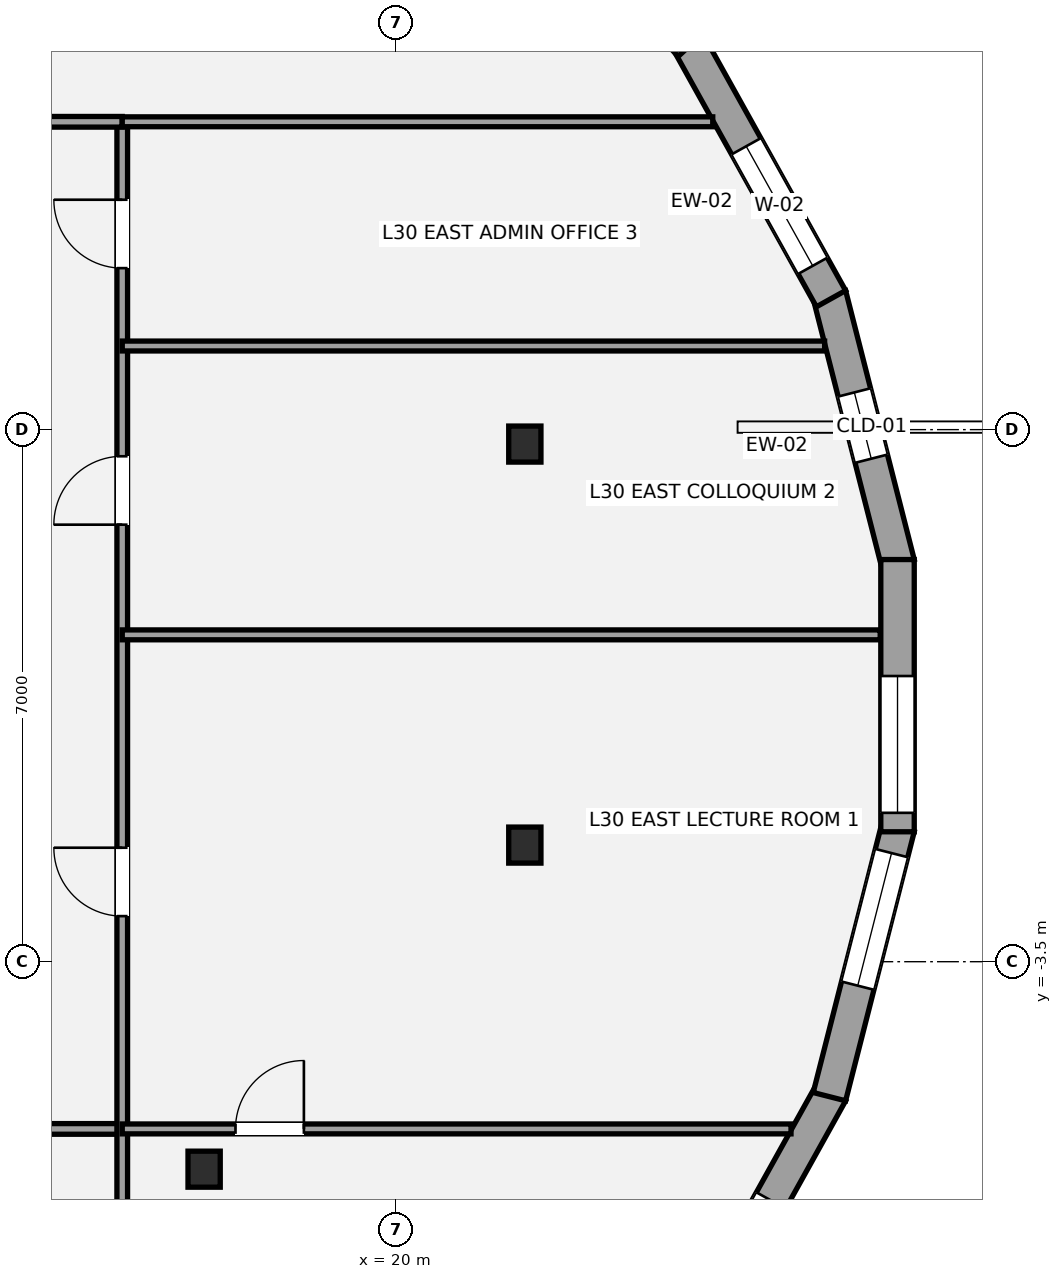
"""IFC4 building model, lengths in metres.
Left out: names, types, materials, properties, quantities, classifications, styles, units other than length and angle.
Written with IfcOpenShell. Run it as: python <this file> out.ifc"""

import sys

from ifc_helpers import new_model, si_unit, direction, frame, frame_2d, origin, origin_2d, place, context, subcontext, project, spatial, rectangle, i_section, extrude, element, fill, save


model = new_model("IFC4")
c1 = context("Model", 3, precision=1e-05, world=origin(), true_north=direction((0.0, 1.0)))
c2 = subcontext(c1, "Body", "Model", "MODEL_VIEW")
j1 = project(units=[si_unit("LENGTHUNIT", "METRE"), si_unit("PLANEANGLEUNIT", "RADIAN")], contexts=[c1])
p1 = place(None, origin())
s1 = spatial("IfcSite", under=j1, at=p1, CompositionType="ELEMENT")
p2 = place(p1, origin())
s2 = spatial("IfcBuilding", under=s1, at=p2, CompositionType="ELEMENT")
p3 = place(p2, frame((0.0, 0.0, 114.1)))
s3 = spatial("IfcBuildingStorey", under=s2, at=p3, CompositionType="ELEMENT", Elevation=114.1)
for number, where, z_axis, x_axis in (
    (1, (21.697, 3.31, 0.0), (0.0, 0.0, 1.0), (1.0, 0.0, 0.0)),
    (2, (17.477, -6.229, 0.0), (0.0, 0.0, 1.0), (1.0, 0.0, 0.0)),
    (3, (21.697, -1.966, 0.0), (0.0, 0.0, 1.0), (1.0, 0.0, 0.0)),
):
    element("IfcColumn", number, at=place(p3, frame(where, z_axis=z_axis, x_axis=x_axis)), inside=s3, PredefinedType="COLUMN", context=c2, shape_type="SweptSolid", body=[
        extrude(i_section(OverallWidth=0.424, OverallDepth=0.474, WebThickness=0.048, FlangeThickness=0.077, at=origin_2d()), origin(), (0.0, 0.0, 1.0), 3.5),
    ])
p4 = place(p3, frame((25.704, 5.276, 0.0), z_axis=(0.0, 0.0, 1.0), x_axis=(0.247172296022, -0.968971545547, 0.0)))
e4 = element("IfcWall", 4, at=p4, inside=s3, PredefinedType="STANDARD", context=c2, shape_type="SweptSolid", body=[
    extrude(rectangle(XDim=3.653, YDim=0.44, at=frame_2d((1.826, 0.0))), origin(), (0.0, 0.0, 1.0), 2.528),
])
p5 = place(p4, frame((1.327, 0.0, 0.58)))
e5 = element("IfcOpeningElement", 5, at=p5, cuts=e4, PredefinedType="OPENING", context=c2, shape_type="SweptSolid", body=[
    extrude(rectangle(XDim=0.9, YDim=1.35, at=frame_2d((0.45, 0.675))), frame((0.0, 0.23, 0.0), z_axis=(0.0, -1.0, 0.0), x_axis=(1.0, 0.0, 0.0)), (0.0, 0.0, 1.0), 0.46),
])
p6 = place(p3, frame((23.844, 8.603, 0.0), z_axis=(0.0, 0.0, 1.0), x_axis=(0.486285838125, -0.873799796086, 0.0)))
e6 = element("IfcWall", 6, at=p6, inside=s3, PredefinedType="STANDARD", context=c2, shape_type="SweptSolid", body=[
    extrude(rectangle(XDim=3.868, YDim=0.44, at=frame_2d((1.934, 0.0))), origin(), (0.0, 0.0, 1.0), 2.528),
])
p7 = place(p6, frame((1.574, 0.0, 0.65)))
e7 = element("IfcOpeningElement", 7, at=p7, cuts=e6, PredefinedType="OPENING", context=c2, shape_type="SweptSolid", body=[
    extrude(rectangle(XDim=1.8, YDim=1.7, at=frame_2d((0.9, 0.85))), frame((0.0, 0.23, 0.0), z_axis=(0.0, -1.0, 0.0), x_axis=(1.0, 0.0, 0.0)), (0.0, 0.0, 1.0), 0.46),
])
p8 = place(p3, frame((21.01, 11.629, 0.0), z_axis=(0.0, 0.0, 1.0), x_axis=(0.682353469166, -0.73102239577, 0.0)))
e8 = element("IfcWall", 8, at=p8, inside=s3, PredefinedType="STANDARD", context=c2, shape_type="SweptSolid", body=[
    extrude(rectangle(XDim=4.199, YDim=0.44, at=frame_2d((2.099, 0.0))), origin(), (0.0, 0.0, 1.0), 2.528),
])
p9 = place(p8, frame((0.65, 0.0, 0.65)))
e9 = element("IfcOpeningElement", 9, at=p9, cuts=e8, PredefinedType="OPENING", context=c2, shape_type="SweptSolid", body=[
    extrude(rectangle(XDim=1.8, YDim=1.7, at=frame_2d((0.9, 0.85))), frame((0.0, 0.23, 0.0), z_axis=(0.0, -1.0, 0.0), x_axis=(1.0, 0.0, 0.0)), (0.0, 0.0, 1.0), 0.46),
])
p10 = place(p3, frame((25.725, -5.223, 0.0), z_axis=(0.0, 0.0, 1.0), x_axis=(-0.486285838125, -0.873799796086, 0.0)))
e10 = element("IfcWall", 10, at=p10, inside=s3, PredefinedType="STANDARD", context=c2, shape_type="SweptSolid", body=[
    extrude(rectangle(XDim=3.868, YDim=0.44, at=frame_2d((1.934, 0.0))), origin(), (0.0, 0.0, 1.0), 2.528),
])
p11 = place(p10, frame((1.623, 0.0, 0.65)))
e11 = element("IfcOpeningElement", 11, at=p11, cuts=e10, PredefinedType="OPENING", context=c2, shape_type="SweptSolid", body=[
    extrude(rectangle(XDim=1.8, YDim=1.7, at=frame_2d((0.9, 0.85))), frame((0.0, 0.23, 0.0), z_axis=(0.0, -1.0, 0.0), x_axis=(1.0, 0.0, 0.0)), (0.0, 0.0, 1.0), 0.46),
])
p12 = place(p3, frame((26.607, -1.736, 0.0), z_axis=(0.0, 0.0, 1.0), x_axis=(-0.247172296022, -0.968971545547, 0.0)))
e12 = element("IfcWall", 12, at=p12, inside=s3, PredefinedType="STANDARD", context=c2, shape_type="SweptSolid", body=[
    extrude(rectangle(XDim=3.653, YDim=0.44, at=frame_2d((1.826, 0.0))), origin(), (0.0, 0.0, 1.0), 2.528),
])
p13 = place(p12, frame((0.345, 0.0, 0.65)))
e13 = element("IfcOpeningElement", 13, at=p13, cuts=e12, PredefinedType="OPENING", context=c2, shape_type="SweptSolid", body=[
    extrude(rectangle(XDim=1.8, YDim=1.7, at=frame_2d((0.9, 0.85))), frame((0.0, 0.23, 0.0), z_axis=(0.0, -1.0, 0.0), x_axis=(1.0, 0.0, 0.0)), (0.0, 0.0, 1.0), 0.46),
])
p14 = place(p3, frame((26.6, 1.791, 0.0), z_axis=(0.0, 0.0, 1.0), x_axis=(0.0, -1.0, 0.0)))
e14 = element("IfcWall", 14, at=p14, inside=s3, PredefinedType="STANDARD", context=c2, shape_type="SweptSolid", body=[
    extrude(rectangle(XDim=3.582, YDim=0.44, at=frame_2d((1.791, 0.0))), origin(), (0.0, 0.0, 1.0), 2.528),
])
p15 = place(p14, frame((1.532, 0.0, 0.65)))
e15 = element("IfcOpeningElement", 15, at=p15, cuts=e14, PredefinedType="OPENING", context=c2, shape_type="SweptSolid", body=[
    extrude(rectangle(XDim=1.8, YDim=1.7, at=frame_2d((0.9, 0.85))), frame((0.0, 0.23, 0.0), z_axis=(0.0, -1.0, 0.0), x_axis=(1.0, 0.0, 0.0)), (0.0, 0.0, 1.0), 0.46),
])
p16 = place(p3, frame((-17.8, -5.7, 0.0), z_axis=(0.0, 0.0, 1.0), x_axis=(1.0, 0.0, 0.0)))
e16 = element("IfcWall", 16, at=p16, inside=s3, PredefinedType="PARTITIONING", context=c2, shape_type="SweptSolid", body=[
    extrude(rectangle(XDim=34.2, YDim=0.14, at=frame_2d((17.1, 0.0))), origin(), (0.0, 0.0, 1.0), 2.688),
])
p17 = place(p16, frame((3.4, 0.0, 0.0)))
e17 = element("IfcOpeningElement", 17, at=p17, cuts=e16, PredefinedType="OPENING", context=c2, shape_type="SweptSolid", body=[
    extrude(rectangle(XDim=1.5, YDim=2.15, at=frame_2d((0.75, 1.075))), frame((0.0, 0.08, 0.0), z_axis=(0.0, -1.0, 0.0), x_axis=(1.0, 0.0, 0.0)), (0.0, 0.0, 1.0), 0.16),
])
p18 = place(p16, frame((9.874, 0.0, 0.0)))
e18 = element("IfcOpeningElement", 18, at=p18, cuts=e16, PredefinedType="OPENING", context=c2, shape_type="SweptSolid", body=[
    extrude(rectangle(XDim=0.9, YDim=2.1, at=frame_2d((0.45, 1.05))), frame((0.0, 0.08, 0.0), z_axis=(0.0, -1.0, 0.0), x_axis=(1.0, 0.0, 0.0)), (0.0, 0.0, 1.0), 0.16),
])
p19 = place(p16, frame((13.147, 0.0, 0.0)))
e19 = element("IfcOpeningElement", 19, at=p19, cuts=e16, PredefinedType="OPENING", context=c2, shape_type="SweptSolid", body=[
    extrude(rectangle(XDim=0.9, YDim=2.1, at=frame_2d((0.45, 1.05))), frame((0.0, 0.08, 0.0), z_axis=(0.0, -1.0, 0.0), x_axis=(1.0, 0.0, 0.0)), (0.0, 0.0, 1.0), 0.16),
])
p20 = place(p16, frame((18.823, 0.0, 0.0)))
e20 = element("IfcOpeningElement", 20, at=p20, cuts=e16, PredefinedType="OPENING", context=c2, shape_type="SweptSolid", body=[
    extrude(rectangle(XDim=1.5, YDim=2.15, at=frame_2d((0.75, 1.075))), frame((0.0, 0.08, 0.0), z_axis=(0.0, -1.0, 0.0), x_axis=(1.0, 0.0, 0.0)), (0.0, 0.0, 1.0), 0.16),
])
p21 = place(p16, frame((28.5, 0.0, 0.0)))
e21 = element("IfcOpeningElement", 21, at=p21, cuts=e16, PredefinedType="OPENING", context=c2, shape_type="SweptSolid", body=[
    extrude(rectangle(XDim=1.5, YDim=2.15, at=frame_2d((0.75, 1.075))), frame((0.0, 0.08, 0.0), z_axis=(0.0, -1.0, 0.0), x_axis=(1.0, 0.0, 0.0)), (0.0, 0.0, 1.0), 0.16),
])
p22 = place(p3, frame((16.4, -14.284, 0.0), z_axis=(0.0, 0.0, 1.0), x_axis=(0.0, 1.0, 0.0)))
e22 = element("IfcWall", 22, at=p22, inside=s3, PredefinedType="PARTITIONING", context=c2, shape_type="SweptSolid", body=[
    extrude(rectangle(XDim=21.834, YDim=0.14, at=frame_2d((10.917, 0.0))), origin(), (0.0, 0.0, 1.0), 2.763),
])
p23 = place(p22, frame((11.383, 0.0, 0.0)))
e23 = element("IfcOpeningElement", 23, at=p23, cuts=e22, PredefinedType="OPENING", context=c2, shape_type="SweptSolid", body=[
    extrude(rectangle(XDim=0.9, YDim=2.1, at=frame_2d((0.45, 1.05))), frame((0.0, 0.08, 0.0), z_axis=(0.0, -1.0, 0.0), x_axis=(1.0, 0.0, 0.0)), (0.0, 0.0, 1.0), 0.16),
])
p24 = place(p22, frame((16.533, 0.0, 0.0)))
e24 = element("IfcOpeningElement", 24, at=p24, cuts=e22, PredefinedType="OPENING", context=c2, shape_type="SweptSolid", body=[
    extrude(rectangle(XDim=0.9, YDim=2.1, at=frame_2d((0.45, 1.05))), frame((0.0, 0.08, 0.0), z_axis=(0.0, -1.0, 0.0), x_axis=(1.0, 0.0, 0.0)), (0.0, 0.0, 1.0), 0.16),
])
p25 = place(p22, frame((19.908, 0.0, 0.0)))
e25 = element("IfcOpeningElement", 25, at=p25, cuts=e22, PredefinedType="OPENING", context=c2, shape_type="SweptSolid", body=[
    extrude(rectangle(XDim=0.9, YDim=2.1, at=frame_2d((0.45, 1.05))), frame((0.0, 0.08, 0.0), z_axis=(0.0, -1.0, 0.0), x_axis=(1.0, 0.0, 0.0)), (0.0, 0.0, 1.0), 0.16),
])
p26 = place(p3, frame((13.9, 7.55, 0.0), z_axis=(0.0, 0.0, 1.0), x_axis=(1.0, 0.0, 0.0)))
e26 = element("IfcWall", 26, at=p26, inside=s3, PredefinedType="PARTITIONING", context=c2, shape_type="SweptSolid", body=[
    extrude(rectangle(XDim=2.5, YDim=0.14, at=frame_2d((1.25, 0.0))), origin(), (0.0, 0.0, 1.0), 2.763),
])
p27 = place(p26, frame((0.32, 0.0, 0.0)))
e27 = element("IfcOpeningElement", 27, at=p27, cuts=e26, PredefinedType="OPENING", context=c2, shape_type="SweptSolid", body=[
    extrude(rectangle(XDim=0.92, YDim=2.15, at=frame_2d((0.46, 1.075))), frame((0.0, 0.08, 0.0), z_axis=(0.0, -1.0, 0.0), x_axis=(1.0, 0.0, 0.0)), (0.0, 0.0, 1.0), 0.16),
])
p28 = place(p3, frame((16.4, 7.55, 0.0), z_axis=(0.0, 0.0, 1.0), x_axis=(1.0, 0.0, 0.0)))
e28 = element("IfcWall", 28, at=p28, inside=s3, PredefinedType="PARTITIONING", context=c2, shape_type="SweptSolid", body=[
    extrude(rectangle(XDim=7.769, YDim=0.13, at=frame_2d((3.885, 0.0))), origin(), (0.0, 0.0, 1.0), 2.763),
])
p29 = place(p3, frame((16.4, -5.7, 0.0), z_axis=(0.0, 0.0, 1.0), x_axis=(1.0, 0.0, 0.0)))
e29 = element("IfcWall", 29, at=p29, inside=s3, PredefinedType="PARTITIONING", context=c2, shape_type="SweptSolid", body=[
    extrude(rectangle(XDim=8.799, YDim=0.13, at=frame_2d((4.399, 0.0))), origin(), (0.0, 0.0, 1.0), 2.688),
])
p30 = place(p29, frame((1.49, 0.0, 0.0)))
e30 = element("IfcOpeningElement", 30, at=p30, cuts=e29, PredefinedType="OPENING", context=c2, shape_type="SweptSolid", body=[
    extrude(rectangle(XDim=0.9, YDim=2.1, at=frame_2d((0.45, 1.05))), frame((0.0, 0.075, 0.0), z_axis=(0.0, -1.0, 0.0), x_axis=(1.0, 0.0, 0.0)), (0.0, 0.0, 1.0), 0.15),
])
p31 = place(p3, frame((16.4, 0.8, 0.0), z_axis=(0.0, 0.0, 1.0), x_axis=(1.0, 0.0, 0.0)))
e31 = element("IfcWall", 31, at=p31, inside=s3, PredefinedType="PARTITIONING", context=c2, shape_type="SweptSolid", body=[
    extrude(rectangle(XDim=9.972, YDim=0.13, at=frame_2d((4.986, 0.0))), origin(), (0.0, 0.0, 1.0), 2.763),
])
p32 = place(p3, frame((16.4, 4.6, 0.0), z_axis=(0.0, 0.0, 1.0), x_axis=(1.0, 0.0, 0.0)))
e32 = element("IfcWall", 32, at=p32, inside=s3, PredefinedType="PARTITIONING", context=c2, shape_type="SweptSolid", body=[
    extrude(rectangle(XDim=9.241, YDim=0.13, at=frame_2d((4.621, 0.0))), origin(), (0.0, 0.0, 1.0), 3.31),
])
p33 = place(p5, origin())
e33 = element("IfcWindow", 33, at=p33, inside=s3, PartitioningType="SINGLE_PANEL", PredefinedType="WINDOW", context=c2, shape_type="SweptSolid", body=[
    extrude(rectangle(XDim=0.9, YDim=1.35, at=frame_2d((0.45, 0.675))), frame((0.0, -0.01, 0.0), z_axis=(0.0, -1.0, 0.0), x_axis=(1.0, 0.0, 0.0)), (0.0, 0.0, 1.0), 0.06),
])
fill(e5, e33)
p34 = place(p7, origin())
e34 = element("IfcWindow", 34, at=p34, inside=s3, PartitioningType="SINGLE_PANEL", PredefinedType="WINDOW", context=c2, shape_type="SweptSolid", body=[
    extrude(rectangle(XDim=1.8, YDim=1.7, at=frame_2d((0.9, 0.85))), frame((0.0, -0.01, 0.0), z_axis=(0.0, -1.0, 0.0), x_axis=(1.0, 0.0, 0.0)), (0.0, 0.0, 1.0), 0.06),
])
fill(e7, e34)
p35 = place(p11, origin())
e35 = element("IfcWindow", 35, at=p35, inside=s3, PartitioningType="SINGLE_PANEL", PredefinedType="WINDOW", context=c2, shape_type="SweptSolid", body=[
    extrude(rectangle(XDim=1.8, YDim=1.7, at=frame_2d((0.9, 0.85))), frame((0.0, -0.01, 0.0), z_axis=(0.0, -1.0, 0.0), x_axis=(1.0, 0.0, 0.0)), (0.0, 0.0, 1.0), 0.06),
])
fill(e11, e35)
p36 = place(p13, origin())
e36 = element("IfcWindow", 36, at=p36, inside=s3, PartitioningType="SINGLE_PANEL", PredefinedType="WINDOW", context=c2, shape_type="SweptSolid", body=[
    extrude(rectangle(XDim=1.8, YDim=1.7, at=frame_2d((0.9, 0.85))), frame((0.0, -0.01, 0.0), z_axis=(0.0, -1.0, 0.0), x_axis=(1.0, 0.0, 0.0)), (0.0, 0.0, 1.0), 0.06),
])
fill(e13, e36)
p37 = place(p15, origin())
e37 = element("IfcWindow", 37, at=p37, inside=s3, PartitioningType="SINGLE_PANEL", PredefinedType="WINDOW", context=c2, shape_type="SweptSolid", body=[
    extrude(rectangle(XDim=1.8, YDim=1.7, at=frame_2d((0.9, 0.85))), frame((0.0, -0.01, 0.0), z_axis=(0.0, -1.0, 0.0), x_axis=(1.0, 0.0, 0.0)), (0.0, 0.0, 1.0), 0.06),
])
fill(e15, e37)
p38 = place(p30, origin())
e38 = element("IfcDoor", 38, at=p38, inside=s3, OperationType="SINGLE_SWING_RIGHT", PredefinedType="DOOR", context=c2, shape_type="SweptSolid", body=[
    extrude(rectangle(XDim=0.9, YDim=2.1, at=frame_2d((0.45, 1.05))), frame((0.0, 0.025, 0.0), z_axis=(0.0, -1.0, 0.0), x_axis=(1.0, 0.0, 0.0)), (0.0, 0.0, 1.0), 0.05),
])
fill(e30, e38)
p39 = place(p23, origin())
e39 = element("IfcDoor", 39, at=p39, inside=s3, OperationType="SINGLE_SWING_RIGHT", PredefinedType="DOOR", context=c2, shape_type="SweptSolid", body=[
    extrude(rectangle(XDim=0.9, YDim=2.1, at=frame_2d((0.45, 1.05))), frame((0.0, 0.025, 0.0), z_axis=(0.0, -1.0, 0.0), x_axis=(1.0, 0.0, 0.0)), (0.0, 0.0, 1.0), 0.05),
])
fill(e23, e39)
p40 = place(p24, origin())
e40 = element("IfcDoor", 40, at=p40, inside=s3, OperationType="SINGLE_SWING_LEFT", PredefinedType="DOOR", context=c2, shape_type="SweptSolid", body=[
    extrude(rectangle(XDim=0.9, YDim=2.1, at=frame_2d((0.45, 1.05))), frame((0.0, 0.025, 0.0), z_axis=(0.0, -1.0, 0.0), x_axis=(1.0, 0.0, 0.0)), (0.0, 0.0, 1.0), 0.05),
])
fill(e24, e40)
p41 = place(p25, origin())
e41 = element("IfcDoor", 41, at=p41, inside=s3, OperationType="SINGLE_SWING_RIGHT", PredefinedType="DOOR", context=c2, shape_type="SweptSolid", body=[
    extrude(rectangle(XDim=0.9, YDim=2.1, at=frame_2d((0.45, 1.05))), frame((0.0, 0.025, 0.0), z_axis=(0.0, -1.0, 0.0), x_axis=(1.0, 0.0, 0.0)), (0.0, 0.0, 1.0), 0.05),
])
fill(e25, e41)
save(model, sys.argv[1])
